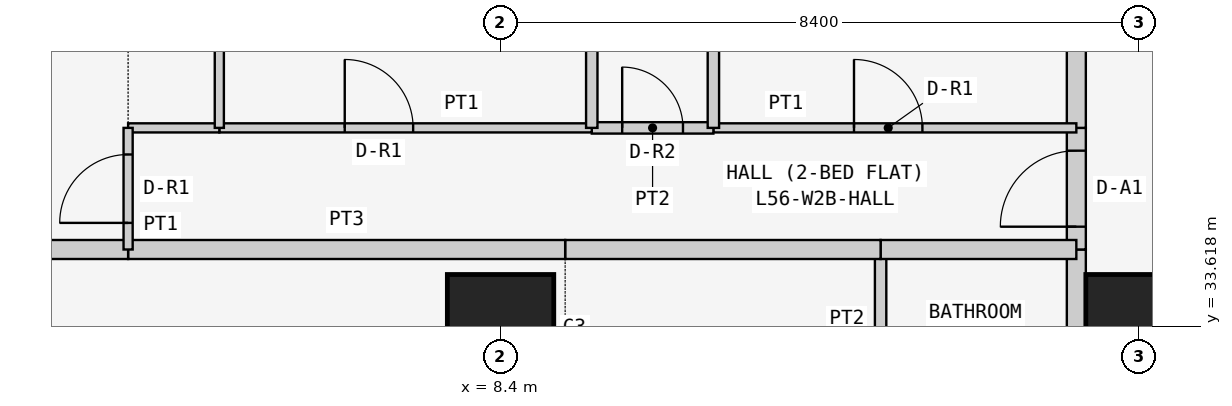
"""IFC4 building model, lengths in metres.
Left out: names, types, materials, properties, quantities, classifications, styles, units other than length and angle.
Written with IfcOpenShell. Run it as: python <this file> out.ifc"""

import sys

from ifc_helpers import new_model, si_unit, direction, frame, frame_2d, origin, origin_2d, place, context, subcontext, project, spatial, rectangle, extrude, element, fill, save


model = new_model("IFC4")
c1 = context("Model", 3, precision=1e-05, world=origin(), true_north=direction((0.0, 1.0)))
c2 = subcontext(c1, "Body", "Model", "MODEL_VIEW")
j1 = project(units=[si_unit("LENGTHUNIT", "METRE"), si_unit("PLANEANGLEUNIT", "RADIAN")], contexts=[c1])
p1 = place(None, origin())
s1 = spatial("IfcSite", under=j1, at=p1, CompositionType="ELEMENT")
p2 = place(p1, origin())
s2 = spatial("IfcBuilding", under=s1, at=p2, CompositionType="ELEMENT")
p3 = place(p2, frame((0.0, 0.0, 215.7)))
s3 = spatial("IfcBuildingStorey", under=s2, at=p3, CompositionType="ELEMENT", Elevation=215.7)
for number, where, z_axis, x_axis in (
    (1, (8.4, 33.6, 0.0), (0.0, 0.0, 1.0), (1.0, 0.0, 0.0)),
    (2, (16.8, 33.6, 0.0), (0.0, 0.0, 1.0), (1.0, 0.0, 0.0)),
):
    element("IfcColumn", number, at=place(p3, frame(where, z_axis=z_axis, x_axis=x_axis)), inside=s3, PredefinedType="COLUMN", context=c2, shape_type="SweptSolid", body=[
        extrude(rectangle(XDim=1.4, YDim=1.4, at=origin_2d()), origin(), (0.0, 0.0, 1.0), 3.6),
    ])
p4 = place(p3, frame((15.975, 32.0, 0.0), z_axis=(0.0, 0.0, 1.0), x_axis=(0.0, 1.0, 0.0)))
e3 = element("IfcWall", 3, at=p4, inside=s3, PredefinedType="PARTITIONING", context=c2, shape_type="SweptSolid", body=[
    extrude(rectangle(XDim=2.629, YDim=0.25, at=frame_2d((1.314, 0.0))), origin(), (0.0, 0.0, 1.0), 3.45),
])
p5 = place(p3, frame((15.975, 34.629, 0.0), z_axis=(0.0, 0.0, 1.0), x_axis=(0.0, 1.0, 0.0)))
e4 = element("IfcWall", 4, at=p5, inside=s3, PredefinedType="PARTITIONING", context=c2, shape_type="SweptSolid", body=[
    extrude(rectangle(XDim=1.6, YDim=0.25, at=frame_2d((0.8, 0.0))), origin(), (0.0, 0.0, 1.0), 3.45),
])
p6 = place(p5, frame((0.3, 0.0, 0.0)))
e5 = element("IfcOpeningElement", 5, at=p6, cuts=e4, PredefinedType="OPENING", context=c2, shape_type="SweptSolid", body=[
    extrude(rectangle(XDim=1.0, YDim=2.1, at=frame_2d((0.5, 1.05))), frame((0.0, 0.135, 0.0), z_axis=(0.0, -1.0, 0.0), x_axis=(1.0, 0.0, 0.0)), (0.0, 0.0, 1.0), 0.27),
])
p7 = place(p3, frame((15.975, 36.229, 0.0), z_axis=(0.0, 0.0, 1.0), x_axis=(0.0, 1.0, 0.0)))
e6 = element("IfcWall", 6, at=p7, inside=s3, PredefinedType="PARTITIONING", context=c2, shape_type="SweptSolid", body=[
    extrude(rectangle(XDim=6.471, YDim=0.25, at=frame_2d((3.235, 0.0))), origin(), (0.0, 0.0, 1.0), 3.45),
])
p8 = place(p3, frame((13.4, 32.0, 0.0), z_axis=(0.0, 0.0, 1.0), x_axis=(0.0, 1.0, 0.0)))
e7 = element("IfcWall", 7, at=p8, inside=s3, PredefinedType="PARTITIONING", context=c2, shape_type="SweptSolid", body=[
    extrude(rectangle(XDim=2.629, YDim=0.15, at=frame_2d((1.314, 0.0))), origin(), (0.0, 0.0, 1.0), 3.45),
])
p9 = place(p3, frame((13.4, 34.629, 0.0), z_axis=(0.0, 0.0, 1.0), x_axis=(1.0, 0.0, 0.0)))
e8 = element("IfcWall", 8, at=p9, inside=s3, PredefinedType="PARTITIONING", context=c2, shape_type="SweptSolid", body=[
    extrude(rectangle(XDim=2.575, YDim=0.25, at=frame_2d((1.288, 0.0))), origin(), (0.0, 0.0, 1.0), 3.45),
])
p10 = place(p3, frame((9.25, 34.629, 0.0), z_axis=(0.0, 0.0, 1.0), x_axis=(1.0, 0.0, 0.0)))
e9 = element("IfcWall", 9, at=p10, inside=s3, PredefinedType="PARTITIONING", context=c2, shape_type="SweptSolid", body=[
    extrude(rectangle(XDim=4.15, YDim=0.25, at=frame_2d((2.075, 0.0))), origin(), (0.0, 0.0, 1.0), 3.45),
])
p11 = place(p3, frame((3.5, 34.629, 0.0), z_axis=(0.0, 0.0, 1.0), x_axis=(1.0, 0.0, 0.0)))
e10 = element("IfcWall", 10, at=p11, inside=s3, PredefinedType="PARTITIONING", context=c2, shape_type="SweptSolid", body=[
    extrude(rectangle(XDim=5.75, YDim=0.25, at=frame_2d((2.875, 0.0))), origin(), (0.0, 0.0, 1.0), 3.45),
])
p12 = place(p3, frame((-0.65, 34.629, 0.0), z_axis=(0.0, 0.0, 1.0), x_axis=(1.0, 0.0, 0.0)))
e11 = element("IfcWall", 11, at=p12, inside=s3, PredefinedType="PARTITIONING", context=c2, shape_type="SweptSolid", body=[
    extrude(rectangle(XDim=4.15, YDim=0.25, at=frame_2d((2.075, 0.0))), origin(), (0.0, 0.0, 1.0), 3.45),
])
p13 = place(p3, frame((11.2, 36.229, 0.0), z_axis=(0.0, 0.0, 1.0), x_axis=(1.0, 0.0, 0.0)))
e12 = element("IfcWall", 12, at=p13, inside=s3, PredefinedType="PARTITIONING", context=c2, shape_type="SweptSolid", body=[
    extrude(rectangle(XDim=4.775, YDim=0.12, at=frame_2d((2.388, 0.0))), origin(), (0.0, 0.0, 1.0), 3.45),
])
p14 = place(p13, frame((1.85, 0.0, 0.0)))
e13 = element("IfcOpeningElement", 13, at=p14, cuts=e12, PredefinedType="OPENING", context=c2, shape_type="SweptSolid", body=[
    extrude(rectangle(XDim=0.9, YDim=2.1, at=frame_2d((0.45, 1.05))), frame((0.0, 0.07, 0.0), z_axis=(0.0, -1.0, 0.0), x_axis=(1.0, 0.0, 0.0)), (0.0, 0.0, 1.0), 0.14),
])
p15 = place(p3, frame((9.6, 36.229, 0.0), z_axis=(0.0, 0.0, 1.0), x_axis=(1.0, 0.0, 0.0)))
e14 = element("IfcWall", 14, at=p15, inside=s3, PredefinedType="PARTITIONING", context=c2, shape_type="SweptSolid", body=[
    extrude(rectangle(XDim=1.6, YDim=0.15, at=frame_2d((0.8, 0.0))), origin(), (0.0, 0.0, 1.0), 3.45),
])
p16 = place(p15, frame((0.4, 0.0, 0.0)))
e15 = element("IfcOpeningElement", 15, at=p16, cuts=e14, PredefinedType="OPENING", context=c2, shape_type="SweptSolid", body=[
    extrude(rectangle(XDim=0.8, YDim=2.1, at=frame_2d((0.4, 1.05))), frame((0.0, 0.085, 0.0), z_axis=(0.0, -1.0, 0.0), x_axis=(1.0, 0.0, 0.0)), (0.0, 0.0, 1.0), 0.17),
])
p17 = place(p3, frame((4.7, 36.229, 0.0), z_axis=(0.0, 0.0, 1.0), x_axis=(1.0, 0.0, 0.0)))
e16 = element("IfcWall", 16, at=p17, inside=s3, PredefinedType="PARTITIONING", context=c2, shape_type="SweptSolid", body=[
    extrude(rectangle(XDim=4.9, YDim=0.12, at=frame_2d((2.45, 0.0))), origin(), (0.0, 0.0, 1.0), 3.45),
])
p18 = place(p17, frame((1.65, 0.0, 0.0)))
e17 = element("IfcOpeningElement", 17, at=p18, cuts=e16, PredefinedType="OPENING", context=c2, shape_type="SweptSolid", body=[
    extrude(rectangle(XDim=0.9, YDim=2.1, at=frame_2d((0.45, 1.05))), frame((0.0, 0.07, 0.0), z_axis=(0.0, -1.0, 0.0), x_axis=(1.0, 0.0, 0.0)), (0.0, 0.0, 1.0), 0.14),
])
p19 = place(p3, frame((3.5, 36.229, 0.0), z_axis=(0.0, 0.0, 1.0), x_axis=(1.0, 0.0, 0.0)))
e18 = element("IfcWall", 18, at=p19, inside=s3, PredefinedType="PARTITIONING", context=c2, shape_type="SweptSolid", body=[
    extrude(rectangle(XDim=1.2, YDim=0.12, at=frame_2d((0.6, 0.0))), origin(), (0.0, 0.0, 1.0), 3.45),
])
p20 = place(p3, frame((3.5, 34.629, 0.0), z_axis=(0.0, 0.0, 1.0), x_axis=(0.0, 1.0, 0.0)))
e19 = element("IfcWall", 19, at=p20, inside=s3, PredefinedType="PARTITIONING", context=c2, shape_type="SweptSolid", body=[
    extrude(rectangle(XDim=1.6, YDim=0.12, at=frame_2d((0.8, 0.0))), origin(), (0.0, 0.0, 1.0), 3.45),
])
p21 = place(p20, frame((0.35, 0.0, 0.0)))
e20 = element("IfcOpeningElement", 20, at=p21, cuts=e19, PredefinedType="OPENING", context=c2, shape_type="SweptSolid", body=[
    extrude(rectangle(XDim=0.9, YDim=2.1, at=frame_2d((0.45, 1.05))), frame((0.0, 0.07, 0.0), z_axis=(0.0, -1.0, 0.0), x_axis=(1.0, 0.0, 0.0)), (0.0, 0.0, 1.0), 0.14),
])
for number, where, z_axis, x_axis in (
    (21, (11.2, 36.229, 0.0), (0.0, 0.0, 1.0), (0.0, 1.0, 0.0)),
    (22, (9.6, 36.229, 0.0), (0.0, 0.0, 1.0), (0.0, 1.0, 0.0)),
):
    element("IfcWall", number, at=place(p3, frame(where, z_axis=z_axis, x_axis=x_axis)), inside=s3, PredefinedType="PARTITIONING", context=c2, shape_type="SweptSolid", body=[
        extrude(rectangle(XDim=6.471, YDim=0.15, at=frame_2d((3.235, 0.0))), origin(), (0.0, 0.0, 1.0), 3.45),
    ])
p22 = place(p3, frame((4.7, 36.229, 0.0), z_axis=(0.0, 0.0, 1.0), x_axis=(0.0, 1.0, 0.0)))
e23 = element("IfcWall", 23, at=p22, inside=s3, PredefinedType="PARTITIONING", context=c2, shape_type="SweptSolid", body=[
    extrude(rectangle(XDim=6.471, YDim=0.12, at=frame_2d((3.235, 0.0))), origin(), (0.0, 0.0, 1.0), 3.45),
])
p23 = place(p6, origin())
e24 = element("IfcDoor", 24, at=p23, inside=s3, OperationType="SINGLE_SWING_LEFT", PredefinedType="DOOR", context=c2, shape_type="SweptSolid", body=[
    extrude(rectangle(XDim=1.0, YDim=2.1, at=frame_2d((0.5, 1.05))), frame((0.0, 0.025, 0.0), z_axis=(0.0, -1.0, 0.0), x_axis=(1.0, 0.0, 0.0)), (0.0, 0.0, 1.0), 0.05),
])
fill(e5, e24)
p24 = place(p14, origin())
e25 = element("IfcDoor", 25, at=p24, inside=s3, OperationType="SINGLE_SWING_LEFT", PredefinedType="DOOR", context=c2, shape_type="SweptSolid", body=[
    extrude(rectangle(XDim=0.9, YDim=2.1, at=frame_2d((0.45, 1.05))), frame((0.0, 0.025, 0.0), z_axis=(0.0, -1.0, 0.0), x_axis=(1.0, 0.0, 0.0)), (0.0, 0.0, 1.0), 0.05),
])
fill(e13, e25)
p25 = place(p16, origin())
e26 = element("IfcDoor", 26, at=p25, inside=s3, OperationType="SINGLE_SWING_LEFT", PredefinedType="DOOR", context=c2, shape_type="SweptSolid", body=[
    extrude(rectangle(XDim=0.8, YDim=2.1, at=frame_2d((0.4, 1.05))), frame((0.0, 0.025, 0.0), z_axis=(0.0, -1.0, 0.0), x_axis=(1.0, 0.0, 0.0)), (0.0, 0.0, 1.0), 0.05),
])
fill(e15, e26)
p26 = place(p18, origin())
e27 = element("IfcDoor", 27, at=p26, inside=s3, OperationType="SINGLE_SWING_LEFT", PredefinedType="DOOR", context=c2, shape_type="SweptSolid", body=[
    extrude(rectangle(XDim=0.9, YDim=2.1, at=frame_2d((0.45, 1.05))), frame((0.0, 0.025, 0.0), z_axis=(0.0, -1.0, 0.0), x_axis=(1.0, 0.0, 0.0)), (0.0, 0.0, 1.0), 0.05),
])
fill(e17, e27)
p27 = place(p21, origin())
e28 = element("IfcDoor", 28, at=p27, inside=s3, OperationType="SINGLE_SWING_LEFT", PredefinedType="DOOR", context=c2, shape_type="SweptSolid", body=[
    extrude(rectangle(XDim=0.9, YDim=2.1, at=frame_2d((0.45, 1.05))), frame((0.0, 0.025, 0.0), z_axis=(0.0, -1.0, 0.0), x_axis=(1.0, 0.0, 0.0)), (0.0, 0.0, 1.0), 0.05),
])
fill(e20, e28)
save(model, sys.argv[1])
